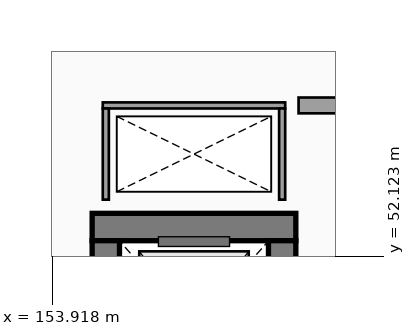
"""IFC4 building model, lengths in metres.
Left out: names, types, materials, properties, quantities, classifications, styles, units other than length and angle.
Written with IfcOpenShell. Run it as: python <this file> out.ifc"""

import sys

from ifc_helpers import new_model, si_unit, direction, frame, frame_2d, origin, place, context, subcontext, project, spatial, rectangle, extrude, element, save


model = new_model("IFC4")
c1 = context("Model", 3, precision=1e-05, world=origin(), true_north=direction((0.0, 1.0)))
c2 = subcontext(c1, "Body", "Model", "MODEL_VIEW")
j1 = project(units=[si_unit("LENGTHUNIT", "METRE"), si_unit("PLANEANGLEUNIT", "RADIAN")], contexts=[c1])
p1 = place(None, origin())
s1 = spatial("IfcSite", under=j1, at=p1, CompositionType="ELEMENT")
p2 = place(p1, origin())
s2 = spatial("IfcBuilding", under=s1, at=p2, CompositionType="ELEMENT")
p3 = place(p2, frame((0.0, 0.0, 4.8)))
s3 = spatial("IfcBuildingStorey", under=s2, at=p3, CompositionType="ELEMENT", Elevation=4.8)
p4 = place(p3, frame((157.925, 52.6, 0.0), z_axis=(0.0, 0.0, 1.0), x_axis=(-1.0, 0.0, 0.0)))
e1 = element("IfcWall", 1, at=p4, inside=s3, PredefinedType="SHEAR", context=c2, shape_type="SweptSolid", body=[
    extrude(rectangle(XDim=3.35, YDim=0.45, at=frame_2d((1.675, 0.0))), origin(), (0.0, 0.0, 1.0), 4.52),
])
p5 = place(p3, frame((154.8, 52.375, 0.0), z_axis=(0.0, 0.0, 1.0), x_axis=(0.0, -1.0, 0.0)))
e2 = element("IfcWall", 2, at=p5, inside=s3, PredefinedType="SHEAR", context=c2, shape_type="SweptSolid", body=[
    extrude(rectangle(XDim=2.75, YDim=0.45, at=frame_2d((1.375, 0.0))), origin(), (0.0, 0.0, 1.0), 4.52),
])
p6 = place(p3, frame((157.7, 49.625, 0.0), z_axis=(0.0, 0.0, 1.0), x_axis=(0.0, 1.0, 0.0)))
e3 = element("IfcWall", 3, at=p6, inside=s3, PredefinedType="SHEAR", context=c2, shape_type="SweptSolid", body=[
    extrude(rectangle(XDim=2.75, YDim=0.45, at=frame_2d((1.375, 0.0))), origin(), (0.0, 0.0, 1.0), 4.52),
])
p7 = place(p6, frame((0.725, 0.0, 0.0), z_axis=(0.0, 0.0, 1.0), x_axis=(1.0, 0.0, 0.0)))
e4 = element("IfcOpeningElement", 4, at=p7, cuts=e3, PredefinedType="OPENING", context=c2, shape_type="SweptSolid", body=[
    extrude(rectangle(XDim=1.3, YDim=2.25, at=frame_2d((0.65, 1.125))), frame((0.0, 0.235, 0.0), z_axis=(0.0, -1.0, 0.0), x_axis=(1.0, 0.0, 0.0)), (0.0, 0.0, 1.0), 0.47),
])
p8 = place(p3, frame((157.75, 54.6, 0.0), z_axis=(0.0, 0.0, 1.0), x_axis=(-1.0, 0.0, 0.0)))
e5 = element("IfcWall", 5, at=p8, inside=s3, PredefinedType="PARTITIONING", context=c2, shape_type="SweptSolid", body=[
    extrude(rectangle(XDim=3.0, YDim=0.1, at=frame_2d((1.5, 0.0))), origin(), (0.0, 0.0, 1.0), 4.52),
])
for number, where, z_axis, x_axis in (
    (6, (154.8, 54.55, 0.0), (0.0, 0.0, 1.0), (0.0, -1.0, 0.0)),
    (7, (157.7, 53.05, 0.0), (0.0, 0.0, 1.0), (0.0, 1.0, 0.0)),
):
    element("IfcWall", number, at=place(p3, frame(where, z_axis=z_axis, x_axis=x_axis)), inside=s3, PredefinedType="PARTITIONING", context=c2, shape_type="SweptSolid", body=[
        extrude(rectangle(XDim=1.5, YDim=0.1, at=frame_2d((0.75, 0.0))), origin(), (0.0, 0.0, 1.0), 4.52),
    ])
p9 = place(p3, frame((161.73, 54.6, 0.0), z_axis=(0.0, 0.0, 1.0), x_axis=(-1.0, 0.0, 0.0)))
e8 = element("IfcWall", 8, at=p9, inside=s3, PredefinedType="SOLIDWALL", context=c2, shape_type="SweptSolid", body=[
    extrude(rectangle(XDim=3.76, YDim=0.26, at=frame_2d((1.88, 0.0))), origin(), (0.0, 0.0, 1.0), 4.52),
])
p10 = place(p9, frame((2.805, 0.0, 0.0), z_axis=(0.0, 0.0, 1.0), x_axis=(-1.0, 0.0, 0.0)))
e9 = element("IfcOpeningElement", 9, at=p10, cuts=e8, PredefinedType="OPENING", context=c2, shape_type="SweptSolid", body=[
    extrude(rectangle(XDim=1.85, YDim=2.25, at=frame_2d((0.925, 1.125))), frame((0.0, 0.14, 0.0), z_axis=(0.0, -1.0, 0.0), x_axis=(1.0, 0.0, 0.0)), (0.0, 0.0, 1.0), 0.28),
])
save(model, sys.argv[1])
